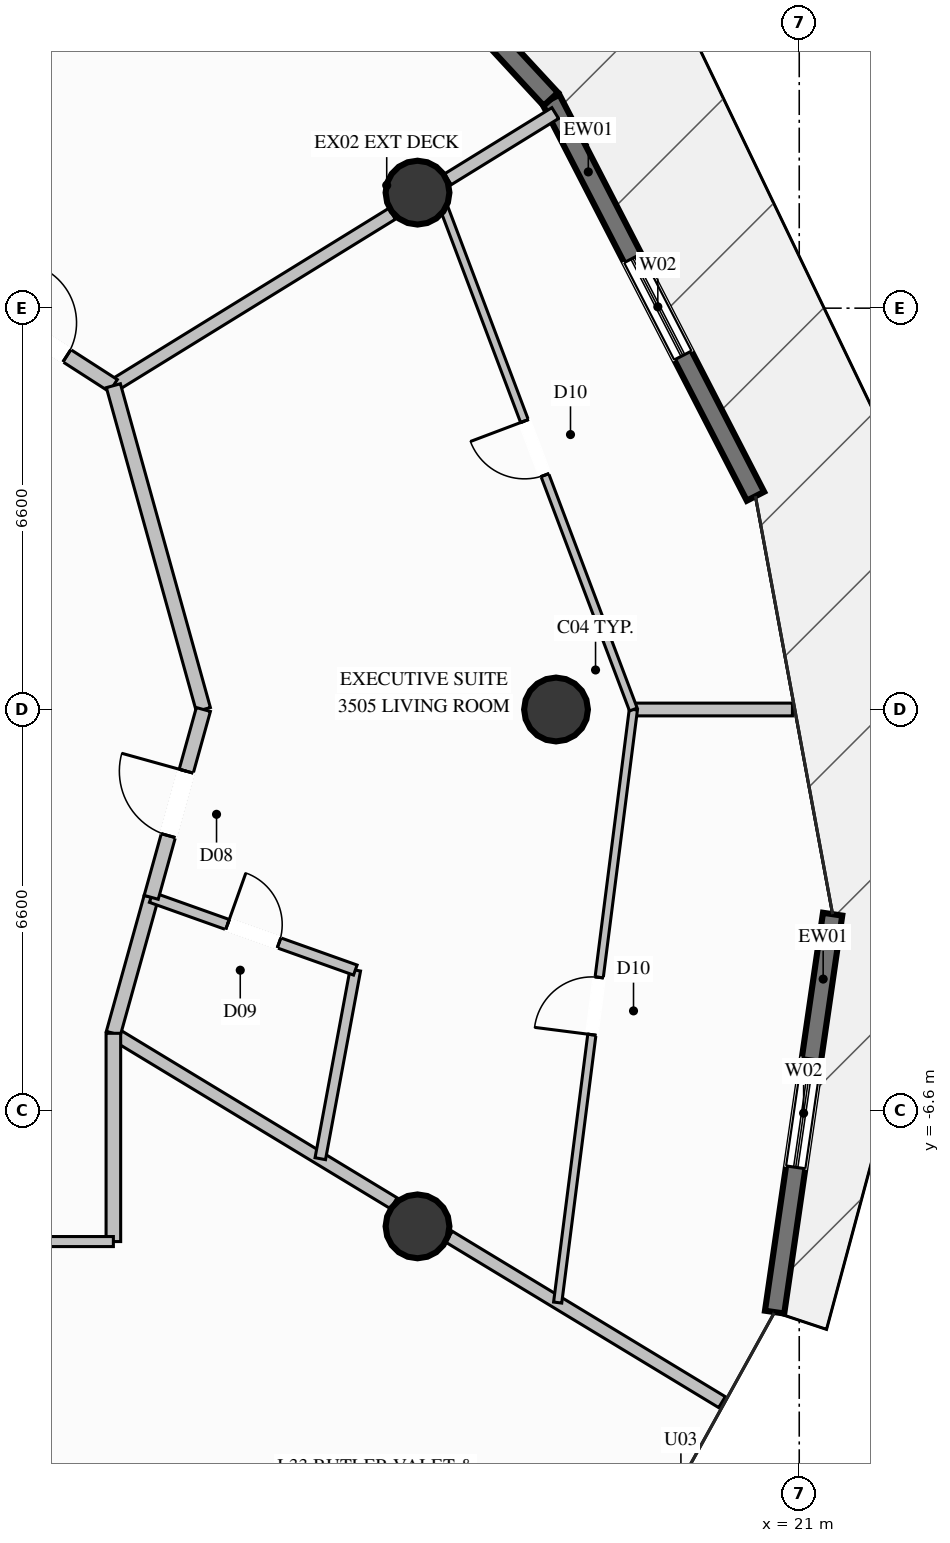
"""IFC4 building model, lengths in metres.
Left out: names, types, materials, properties, quantities, classifications, styles, units other than length and angle.
Written with IfcOpenShell. Run it as: python <this file> out.ifc"""

import sys

from ifc_helpers import new_model, si_unit, direction, frame, frame_2d, origin, origin_2d, place, context, subcontext, project, spatial, rectangle, circle, extrude, element, fill, save


model = new_model("IFC4")
c1 = context("Model", 3, precision=1e-05, world=origin(), true_north=direction((0.0, 1.0)))
c2 = subcontext(c1, "Body", "Model", "MODEL_VIEW")
j1 = project(units=[si_unit("LENGTHUNIT", "METRE"), si_unit("PLANEANGLEUNIT", "RADIAN")], contexts=[c1])
p1 = place(None, origin())
s1 = spatial("IfcSite", under=j1, at=p1, CompositionType="ELEMENT")
p2 = place(p1, origin())
s2 = spatial("IfcBuilding", under=s1, at=p2, CompositionType="ELEMENT")
p3 = place(p2, frame((0.0, 0.0, 131.4)))
s3 = spatial("IfcBuildingStorey", under=s2, at=p3, CompositionType="ELEMENT", Elevation=131.4)
for number, where, z_axis, x_axis in (
    (1, (17.0, 0.0, 0.0), (0.0, 0.0, 1.0), (1.0, 0.0, 0.0)),
    (2, (14.722, 8.5, 0.0), (0.0, 0.0, 1.0), (1.0, 0.0, 0.0)),
    (3, (14.722, -8.5, 0.0), (0.0, 0.0, 1.0), (1.0, 0.0, 0.0)),
):
    element("IfcColumn", number, at=place(p3, frame(where, z_axis=z_axis, x_axis=x_axis)), inside=s3, PredefinedType="COLUMN", context=c2, shape_type="SweptSolid", body=[
        extrude(circle(Radius=0.525, at=origin_2d()), origin(), (0.0, 0.0, 1.0), 3.6),
    ])
p4 = place(p3, frame((21.549, -3.366, 0.0), z_axis=(0.0, 0.0, 1.0), x_axis=(-0.144273756633, -0.989537812894, 0.0)))
e4 = element("IfcWall", 4, at=p4, inside=s3, PredefinedType="SOLIDWALL", context=c2, shape_type="SweptSolid", body=[
    extrude(rectangle(XDim=6.613, YDim=0.32, at=frame_2d((3.307, 0.0))), origin(), (0.0, 0.0, 1.0), 3.35),
])
p5 = place(p4, frame((2.407, 0.0, 0.35)))
e5 = element("IfcOpeningElement", 5, at=p5, cuts=e4, PredefinedType="OPENING", context=c2, shape_type="SweptSolid", body=[
    extrude(rectangle(XDim=1.8, YDim=2.6, at=frame_2d((0.9, 1.3))), frame((0.0, 0.17, 0.0), z_axis=(0.0, -1.0, 0.0), x_axis=(1.0, 0.0, 0.0)), (0.0, 0.0, 1.0), 0.34),
])
p6 = place(p3, frame((16.914, 10.037, 0.0), z_axis=(0.0, 0.0, 1.0), x_axis=(0.458173043938, -0.888863016335, 0.0)))
e6 = element("IfcWall", 6, at=p6, inside=s3, PredefinedType="SOLIDWALL", context=c2, shape_type="SweptSolid", body=[
    extrude(rectangle(XDim=7.346, YDim=0.32, at=frame_2d((3.673, 0.0))), origin(), (0.0, 0.0, 1.0), 3.35),
])
p7 = place(p6, frame((2.942, 0.0, 0.35)))
e7 = element("IfcOpeningElement", 7, at=p7, cuts=e6, PredefinedType="OPENING", context=c2, shape_type="SweptSolid", body=[
    extrude(rectangle(XDim=1.8, YDim=2.6, at=frame_2d((0.9, 1.3))), frame((0.0, 0.17, 0.0), z_axis=(0.0, -1.0, 0.0), x_axis=(1.0, 0.0, 0.0)), (0.0, 0.0, 1.0), 0.34),
])
p8 = place(p3, frame((11.78, 15.585, 0.0), z_axis=(0.0, 0.0, 1.0), x_axis=(0.679203838045, -0.733949689274, 0.0)))
e8 = element("IfcWall", 8, at=p8, inside=s3, PredefinedType="SOLIDWALL", context=c2, shape_type="SweptSolid", body=[
    extrude(rectangle(XDim=7.559, YDim=0.32, at=frame_2d((3.779, 0.0))), origin(), (0.0, 0.0, 1.0), 3.35),
])
p9 = place(p8, frame((3.229, 0.0, 0.0)))
e9 = element("IfcOpeningElement", 9, at=p9, cuts=e8, PredefinedType="OPENING", context=c2, shape_type="SweptSolid", body=[
    extrude(rectangle(XDim=1.1, YDim=2.2, at=frame_2d((0.55, 1.1))), frame((0.0, 0.17, 0.0), z_axis=(0.0, -1.0, 0.0), x_axis=(1.0, 0.0, 0.0)), (0.0, 0.0, 1.0), 0.34),
])
p10 = place(p3, frame((9.72, 5.325, 0.0), z_axis=(0.0, 0.0, 1.0), x_axis=(0.851091187082, 0.525017896144, 0.0)))
e10 = element("IfcWall", 10, at=p10, inside=s3, PredefinedType="PARTITIONING", context=c2, shape_type="SweptSolid", body=[
    extrude(rectangle(XDim=5.385, YDim=0.21, at=frame_2d((2.692, 0.0))), origin(), (0.0, 0.0, 1.0), 2.791),
])
p11 = place(p3, frame((15.221, 8.719, 0.0), z_axis=(0.0, 0.0, 1.0), x_axis=(0.851169117453, 0.524891544506, 0.0)))
e11 = element("IfcWall", 11, at=p11, inside=s3, PredefinedType="PARTITIONING", context=c2, shape_type="SweptSolid", body=[
    extrude(rectangle(XDim=2.075, YDim=0.21, at=frame_2d((1.038, 0.0))), origin(), (0.0, 0.0, 1.0), 3.35),
])
p12 = place(p3, frame((9.72, -5.325, 0.0), z_axis=(0.0, 0.0, 1.0), x_axis=(0.855199655735, -0.518298706183, 0.0)))
e12 = element("IfcWall", 12, at=p12, inside=s3, PredefinedType="PARTITIONING", context=c2, shape_type="SweptSolid", body=[
    extrude(rectangle(XDim=5.393, YDim=0.21, at=frame_2d((2.697, 0.0))), origin(), (0.0, 0.0, 1.0), 2.791),
])
p13 = place(p3, frame((15.24, -8.67, 0.0), z_axis=(0.0, 0.0, 1.0), x_axis=(0.855199080738, -0.518299654935, 0.0)))
e13 = element("IfcWall", 13, at=p13, inside=s3, PredefinedType="PARTITIONING", context=c2, shape_type="SweptSolid", body=[
    extrude(rectangle(XDim=5.25, YDim=0.21, at=frame_2d((2.625, 0.0))), origin(), (0.0, 0.0, 1.0), 3.35),
])
p14 = place(p3, frame((7.35, 6.85, 0.0), z_axis=(0.0, 0.0, 1.0), x_axis=(0.840910978735, -0.541173471119, 0.0)))
e14 = element("IfcWall", 14, at=p14, inside=s3, PredefinedType="PARTITIONING", context=c2, shape_type="SweptSolid", body=[
    extrude(rectangle(XDim=2.818, YDim=0.24, at=frame_2d((1.409, 0.0))), origin(), (0.0, 0.0, 1.0), 3.35),
])
p15 = place(p14, frame((0.909, 0.0, 0.0)))
e15 = element("IfcOpeningElement", 15, at=p15, cuts=e14, PredefinedType="OPENING", context=c2, shape_type="SweptSolid", body=[
    extrude(rectangle(XDim=1.0, YDim=2.2, at=frame_2d((0.5, 1.1))), frame((0.0, 0.13, 0.0), z_axis=(0.0, -1.0, 0.0), x_axis=(1.0, 0.0, 0.0)), (0.0, 0.0, 1.0), 0.26),
])
p16 = place(p3, frame((9.72, -5.325, 0.0), z_axis=(0.0, 0.0, 1.0), x_axis=(0.268045342481, 0.963406297662, 0.0)))
e16 = element("IfcWall", 16, at=p16, inside=s3, PredefinedType="PARTITIONING", context=c2, shape_type="SweptSolid", body=[
    extrude(rectangle(XDim=2.321, YDim=0.24, at=frame_2d((1.16, 0.0))), origin(), (0.0, 0.0, 1.0), 3.35),
])
p17 = place(p3, frame((13.123, -7.387, 0.0), z_axis=(0.0, 0.0, 1.0), x_axis=(0.182540901641, 0.983198260387, 0.0)))
e17 = element("IfcWall", 17, at=p17, inside=s3, PredefinedType="PLUMBINGWALL", context=c2, shape_type="SweptSolid", body=[
    extrude(rectangle(XDim=3.155, YDim=0.175, at=frame_2d((1.578, 0.0))), origin(), (0.0, 0.0, 1.0), 3.35),
])
p18 = place(p3, frame((10.342, -3.089, 0.0), z_axis=(0.0, 0.0, 1.0), x_axis=(0.942017496202, -0.335563759738, 0.0)))
e18 = element("IfcWall", 18, at=p18, inside=s3, PredefinedType="PLUMBINGWALL", context=c2, shape_type="SweptSolid", body=[
    extrude(rectangle(XDim=3.563, YDim=0.175, at=frame_2d((1.782, 0.0))), origin(), (0.0, 0.0, 1.0), 3.35),
])
p19 = place(p18, frame((1.332, 0.0, 0.0)))
e19 = element("IfcOpeningElement", 19, at=p19, cuts=e18, PredefinedType="OPENING", context=c2, shape_type="SweptSolid", body=[
    extrude(rectangle(XDim=0.9, YDim=2.1, at=frame_2d((0.45, 1.05))), frame((0.0, 0.098, 0.0), z_axis=(0.0, -1.0, 0.0), x_axis=(1.0, 0.0, 0.0)), (0.0, 0.0, 1.0), 0.195),
])
p20 = place(p3, frame((18.272, 0.0, 0.0), z_axis=(0.0, 0.0, 1.0), x_axis=(1.0, 0.0, 0.0)))
e20 = element("IfcWall", 20, at=p20, inside=s3, PredefinedType="PARTITIONING", context=c2, shape_type="SweptSolid", body=[
    extrude(rectangle(XDim=2.616, YDim=0.21, at=frame_2d((1.308, 0.0))), origin(), (0.0, 0.0, 1.0), 3.35),
])
p21 = place(p3, frame((11.2, 0.0, 0.0), z_axis=(0.0, 0.0, 1.0), x_axis=(-0.267782838254, 0.963479294815, 0.0)))
e21 = element("IfcWall", 21, at=p21, inside=s3, PredefinedType="PARTITIONING", context=c2, shape_type="SweptSolid", body=[
    extrude(rectangle(XDim=5.527, YDim=0.24, at=frame_2d((2.763, 0.0))), origin(), (0.0, 0.0, 1.0), 2.985),
])
p22 = place(p3, frame((10.342, -3.089, 0.0), z_axis=(0.0, 0.0, 1.0), x_axis=(0.267592805492, 0.963532091032, 0.0)))
e22 = element("IfcWall", 22, at=p22, inside=s3, PredefinedType="PARTITIONING", context=c2, shape_type="SweptSolid", body=[
    extrude(rectangle(XDim=3.206, YDim=0.24, at=frame_2d((1.603, 0.0))), origin(), (0.0, 0.0, 1.0), 2.985),
])
p23 = place(p22, frame((1.053, 0.0, 0.0)))
e23 = element("IfcOpeningElement", 23, at=p23, cuts=e22, PredefinedType="OPENING", context=c2, shape_type="SweptSolid", body=[
    extrude(rectangle(XDim=1.1, YDim=2.3, at=frame_2d((0.55, 1.15))), frame((0.0, 0.13, 0.0), z_axis=(0.0, -1.0, 0.0), x_axis=(1.0, 0.0, 0.0)), (0.0, 0.0, 1.0), 0.26),
])
p24 = place(p3, frame((17.027, -9.753, 0.0), z_axis=(0.0, 0.0, 1.0), x_axis=(0.126613692023, 0.991952102166, 0.0)))
e24 = element("IfcWall", 24, at=p24, inside=s3, PredefinedType="PARTITIONING", context=c2, shape_type="SweptSolid", body=[
    extrude(rectangle(XDim=9.832, YDim=0.135, at=frame_2d((4.916, 0.0))), origin(), (0.0, 0.0, 1.0), 3.35),
])
p25 = place(p24, frame((4.441, 0.0, 0.0)))
e25 = element("IfcOpeningElement", 25, at=p25, cuts=e24, PredefinedType="OPENING", context=c2, shape_type="SweptSolid", body=[
    extrude(rectangle(XDim=0.95, YDim=2.1, at=frame_2d((0.475, 1.05))), frame((0.0, 0.078, 0.0), z_axis=(0.0, -1.0, 0.0), x_axis=(1.0, 0.0, 0.0)), (0.0, 0.0, 1.0), 0.155),
])
p26 = place(p3, frame((18.272, 0.0, 0.0), z_axis=(0.0, 0.0, 1.0), x_axis=(-0.353302931562, 0.935508972993, 0.0)))
e26 = element("IfcWall", 26, at=p26, inside=s3, PredefinedType="PARTITIONING", context=c2, shape_type="SweptSolid", body=[
    extrude(rectangle(XDim=9.191, YDim=0.135, at=frame_2d((4.595, 0.0))), origin(), (0.0, 0.0, 1.0), 2.878),
])
p27 = place(p26, frame((4.12, 0.0, 0.0)))
e27 = element("IfcOpeningElement", 27, at=p27, cuts=e26, PredefinedType="OPENING", context=c2, shape_type="SweptSolid", body=[
    extrude(rectangle(XDim=0.95, YDim=2.1, at=frame_2d((0.475, 1.05))), frame((0.0, 0.078, 0.0), z_axis=(0.0, -1.0, 0.0), x_axis=(1.0, 0.0, 0.0)), (0.0, 0.0, 1.0), 0.155),
])
p28 = place(p3, frame((5.638, -8.75, 0.0), z_axis=(0.0, 0.0, 1.0), x_axis=(0.624175182261, -0.781284418025, 0.0)))
e28 = element("IfcWall", 28, at=p28, inside=s3, PredefinedType="PARTITIONING", context=c2, shape_type="SweptSolid", body=[
    extrude(rectangle(XDim=12.718, YDim=0.21, at=frame_2d((6.359, 0.0))), origin(), (0.0, 0.0, 1.0), 3.35),
])
p29 = place(p3, frame((9.72, -8.75, 0.0), z_axis=(0.0, 0.0, 1.0), x_axis=(0.0, 1.0, 0.0)))
e29 = element("IfcWall", 29, at=p29, inside=s3, PredefinedType="PARTITIONING", context=c2, shape_type="SweptSolid", body=[
    extrude(rectangle(XDim=3.425, YDim=0.24, at=frame_2d((1.712, 0.0))), origin(), (0.0, 0.0, 1.0), 3.35),
])
p30 = place(p3, frame((5.638, -8.75, 0.0), z_axis=(0.0, 0.0, 1.0), x_axis=(1.0, 0.0, 0.0)))
e30 = element("IfcWall", 30, at=p30, inside=s3, PredefinedType="PARTITIONING", context=c2, shape_type="SweptSolid", body=[
    extrude(rectangle(XDim=4.082, YDim=0.165, at=frame_2d((2.041, 0.0))), origin(), (0.0, 0.0, 1.0), 3.35),
])
p31 = place(p30, frame((1.566, 0.0, 0.0)))
e31 = element("IfcOpeningElement", 31, at=p31, cuts=e30, PredefinedType="OPENING", context=c2, shape_type="SweptSolid", body=[
    extrude(rectangle(XDim=0.95, YDim=2.1, at=frame_2d((0.475, 1.05))), frame((0.0, 0.093, 0.0), z_axis=(0.0, -1.0, 0.0), x_axis=(1.0, 0.0, 0.0)), (0.0, 0.0, 1.0), 0.185),
])
p32 = place(p5, origin())
e32 = element("IfcWindow", 32, at=p32, inside=s3, PartitioningType="SINGLE_PANEL", PredefinedType="WINDOW", context=c2, shape_type="SweptSolid", body=[
    extrude(rectangle(XDim=1.8, YDim=2.6, at=frame_2d((0.9, 1.3))), frame((0.0, 0.03, 0.0), z_axis=(0.0, -1.0, 0.0), x_axis=(1.0, 0.0, 0.0)), (0.0, 0.0, 1.0), 0.06),
])
fill(e5, e32)
p33 = place(p7, origin())
e33 = element("IfcWindow", 33, at=p33, inside=s3, PartitioningType="SINGLE_PANEL", PredefinedType="WINDOW", context=c2, shape_type="SweptSolid", body=[
    extrude(rectangle(XDim=1.8, YDim=2.6, at=frame_2d((0.9, 1.3))), frame((0.0, 0.03, 0.0), z_axis=(0.0, -1.0, 0.0), x_axis=(1.0, 0.0, 0.0)), (0.0, 0.0, 1.0), 0.06),
])
fill(e7, e33)
p34 = place(p15, origin())
e34 = element("IfcDoor", 34, at=p34, inside=s3, OperationType="SINGLE_SWING_LEFT", PredefinedType="DOOR", context=c2, shape_type="SweptSolid", body=[
    extrude(rectangle(XDim=1.0, YDim=2.2, at=frame_2d((0.5, 1.1))), frame((0.0, 0.025, 0.0), z_axis=(0.0, -1.0, 0.0), x_axis=(1.0, 0.0, 0.0)), (0.0, 0.0, 1.0), 0.05),
])
fill(e15, e34)
p35 = place(p19, origin())
e35 = element("IfcDoor", 35, at=p35, inside=s3, OperationType="SINGLE_SWING_LEFT", PredefinedType="DOOR", context=c2, shape_type="SweptSolid", body=[
    extrude(rectangle(XDim=0.9, YDim=2.1, at=frame_2d((0.45, 1.05))), frame((0.0, 0.025, 0.0), z_axis=(0.0, -1.0, 0.0), x_axis=(1.0, 0.0, 0.0)), (0.0, 0.0, 1.0), 0.05),
])
fill(e19, e35)
p36 = place(p23, origin())
e36 = element("IfcDoor", 36, at=p36, inside=s3, OperationType="SINGLE_SWING_RIGHT", PredefinedType="DOOR", context=c2, shape_type="SweptSolid", body=[
    extrude(rectangle(XDim=1.1, YDim=2.3, at=frame_2d((0.55, 1.15))), frame((0.0, 0.025, 0.0), z_axis=(0.0, -1.0, 0.0), x_axis=(1.0, 0.0, 0.0)), (0.0, 0.0, 1.0), 0.05),
])
fill(e23, e36)
p37 = place(p25, origin())
e37 = element("IfcDoor", 37, at=p37, inside=s3, OperationType="SINGLE_SWING_LEFT", PredefinedType="DOOR", context=c2, shape_type="SweptSolid", body=[
    extrude(rectangle(XDim=0.95, YDim=2.1, at=frame_2d((0.475, 1.05))), frame((0.0, 0.025, 0.0), z_axis=(0.0, -1.0, 0.0), x_axis=(1.0, 0.0, 0.0)), (0.0, 0.0, 1.0), 0.05),
])
fill(e25, e37)
p38 = place(p27, origin())
e38 = element("IfcDoor", 38, at=p38, inside=s3, OperationType="SINGLE_SWING_RIGHT", PredefinedType="DOOR", context=c2, shape_type="SweptSolid", body=[
    extrude(rectangle(XDim=0.95, YDim=2.1, at=frame_2d((0.475, 1.05))), frame((0.0, 0.025, 0.0), z_axis=(0.0, -1.0, 0.0), x_axis=(1.0, 0.0, 0.0)), (0.0, 0.0, 1.0), 0.05),
])
fill(e27, e38)
save(model, sys.argv[1])
